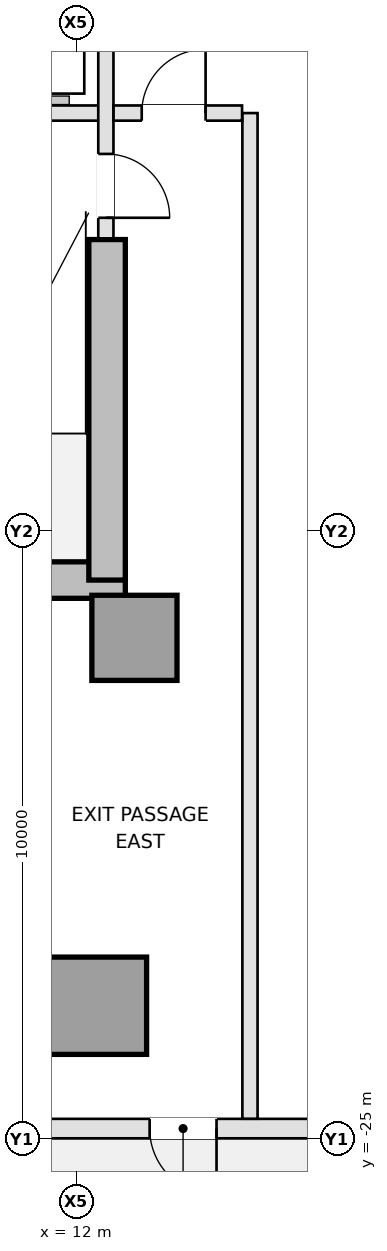
"""IFC4 building model, lengths in metres.
Left out: names, types, materials, properties, quantities, classifications, styles, units other than length and angle.
Written with IfcOpenShell. Run it as: python <this file> out.ifc"""

import sys

from ifc_helpers import new_model, si_unit, direction, frame, frame_2d, origin, origin_2d, place, context, subcontext, project, spatial, rectangle, extrude, element, fill, save


model = new_model("IFC4")
c1 = context("Model", 3, precision=1e-05, world=origin(), true_north=direction((0.0, 1.0)))
c2 = subcontext(c1, "Body", "Model", "MODEL_VIEW")
j1 = project(units=[si_unit("LENGTHUNIT", "METRE"), si_unit("PLANEANGLEUNIT", "RADIAN")], contexts=[c1])
p1 = place(None, origin())
s1 = spatial("IfcSite", under=j1, at=p1, CompositionType="ELEMENT")
p2 = place(p1, origin())
s2 = spatial("IfcBuilding", under=s1, at=p2, CompositionType="ELEMENT")
p3 = place(p2, origin())
s3 = spatial("IfcBuildingStorey", under=s2, at=p3, CompositionType="ELEMENT", Elevation=0.0)
p4 = place(p3, frame((8.6, -15.8, 0.0), z_axis=(0.0, 0.0, 1.0), x_axis=(1.0, 0.0, 0.0)))
e1 = element("IfcWall", 1, at=p4, inside=s3, PredefinedType="SHEAR", context=c2, shape_type="SweptSolid", body=[
    extrude(rectangle(XDim=4.2, YDim=0.6, at=frame_2d((2.1, 0.0))), origin(), (0.0, 0.0, 1.0), 5.0),
])
p5 = place(p3, frame((12.5, -15.8, 0.0), z_axis=(0.0, 0.0, 1.0), x_axis=(0.0, 1.0, 0.0)))
e2 = element("IfcWall", 2, at=p5, inside=s3, PredefinedType="SHEAR", context=c2, shape_type="SweptSolid", body=[
    extrude(rectangle(XDim=5.6, YDim=0.6, at=frame_2d((2.8, 0.0))), origin(), (0.0, 0.0, 1.0), 5.0),
])
p6 = place(p3, frame((12.95, -16.75, 0.0), z_axis=(0.0, 0.0, 1.0), x_axis=(1.0, 0.0, 0.0)))
e3 = element("IfcColumn", 3, at=p6, inside=s3, PredefinedType="COLUMN", context=c2, shape_type="SweptSolid", body=[
    extrude(rectangle(XDim=1.4, YDim=1.4, at=origin_2d()), origin(), (0.0, 0.0, 1.0), 5.0),
])
p7 = place(p3, frame((12.35, -22.8, 0.0), z_axis=(0.0, 0.0, 1.0), x_axis=(1.0, 0.0, 0.0)))
e4 = element("IfcColumn", 4, at=p7, inside=s3, PredefinedType="COLUMN", context=c2, shape_type="SweptSolid", body=[
    extrude(rectangle(XDim=1.6, YDim=1.6, at=origin_2d()), origin(), (0.0, 0.0, 1.0), 5.0),
])
p8 = place(p3, frame((24.6, -24.82, 0.0), z_axis=(0.0, 0.0, 1.0), x_axis=(-1.0, 0.0, 0.0)))
e5 = element("IfcWall", 5, at=p8, inside=s3, PredefinedType="STANDARD", context=c2, shape_type="SweptSolid", body=[
    extrude(rectangle(XDim=13.2, YDim=0.32, at=frame_2d((6.6, 0.0))), origin(), (0.0, 0.0, 1.0), 4.7),
])
p9 = place(p8, frame((10.3, 0.0, 0.0)))
e6 = element("IfcOpeningElement", 6, at=p9, cuts=e5, PredefinedType="OPENING", context=c2, shape_type="SweptSolid", body=[
    extrude(rectangle(XDim=1.1, YDim=2.2, at=frame_2d((0.55, 1.1))), frame((0.0, 0.17, 0.0), z_axis=(0.0, -1.0, 0.0), x_axis=(1.0, 0.0, 0.0)), (0.0, 0.0, 1.0), 0.34),
])
p10 = place(p3, frame((9.16, -8.12, 0.0), z_axis=(0.0, 0.0, 1.0), x_axis=(1.0, 0.0, 0.0)))
e7 = element("IfcWall", 7, at=p10, inside=s3, PredefinedType="PARTITIONING", context=c2, shape_type="SweptSolid", body=[
    extrude(rectangle(XDim=3.22, YDim=0.25, at=frame_2d((1.61, 0.0))), origin(), (0.0, 0.0, 1.0), 4.7),
])
p11 = place(p3, frame((12.48, -5.502, 0.0), z_axis=(0.0, 0.0, 1.0), x_axis=(0.0, -1.0, 0.0)))
e8 = element("IfcWall", 8, at=p11, inside=s3, PredefinedType="PARTITIONING", context=c2, shape_type="SweptSolid", body=[
    extrude(rectangle(XDim=4.678, YDim=0.25, at=frame_2d((2.339, 0.0))), origin(), (0.0, 0.0, 1.0), 4.7),
])
p12 = place(p11, frame((3.29, 0.0, 0.0)))
e9 = element("IfcOpeningElement", 9, at=p12, cuts=e8, PredefinedType="OPENING", context=c2, shape_type="SweptSolid", body=[
    extrude(rectangle(XDim=1.05, YDim=2.15, at=frame_2d((0.525, 1.075))), frame((0.0, 0.135, 0.0), z_axis=(0.0, -1.0, 0.0), x_axis=(1.0, 0.0, 0.0)), (0.0, 0.0, 1.0), 0.27),
])
p13 = place(p3, frame((14.85, -24.658, 0.0), z_axis=(0.0, 0.0, 1.0), x_axis=(0.0, 1.0, 0.0)))
e10 = element("IfcWall", 10, at=p13, inside=s3, PredefinedType="PARTITIONING", context=c2, shape_type="SweptSolid", body=[
    extrude(rectangle(XDim=16.538, YDim=0.25, at=frame_2d((8.269, 0.0))), origin(), (0.0, 0.0, 1.0), 4.7),
])
p14 = place(p3, frame((12.607, -8.12, 0.0), z_axis=(0.0, 0.0, 1.0), x_axis=(1.0, 0.0, 0.0)))
e11 = element("IfcWall", 11, at=p14, inside=s3, PredefinedType="PARTITIONING", context=c2, shape_type="SweptSolid", body=[
    extrude(rectangle(XDim=2.113, YDim=0.25, at=frame_2d((1.057, 0.0))), origin(), (0.0, 0.0, 1.0), 4.7),
])
p15 = place(p14, frame((0.463, 0.0, 0.0)))
e12 = element("IfcOpeningElement", 12, at=p15, cuts=e11, PredefinedType="OPENING", context=c2, shape_type="SweptSolid", body=[
    extrude(rectangle(XDim=1.05, YDim=2.15, at=frame_2d((0.525, 1.075))), frame((0.0, 0.135, 0.0), z_axis=(0.0, -1.0, 0.0), x_axis=(1.0, 0.0, 0.0)), (0.0, 0.0, 1.0), 0.27),
])
p16 = place(p9, origin())
e13 = element("IfcDoor", 13, at=p16, inside=s3, OperationType="SINGLE_SWING_LEFT", PredefinedType="DOOR", context=c2, shape_type="SweptSolid", body=[
    extrude(rectangle(XDim=1.1, YDim=2.2, at=frame_2d((0.55, 1.1))), frame((0.0, 0.025, 0.0), z_axis=(0.0, -1.0, 0.0), x_axis=(1.0, 0.0, 0.0)), (0.0, 0.0, 1.0), 0.05),
])
fill(e6, e13)
p17 = place(p15, origin())
e14 = element("IfcDoor", 14, at=p17, inside=s3, OperationType="SINGLE_SWING_RIGHT", PredefinedType="DOOR", context=c2, shape_type="SweptSolid", body=[
    extrude(rectangle(XDim=1.05, YDim=2.15, at=frame_2d((0.525, 1.075))), frame((0.0, 0.025, 0.0), z_axis=(0.0, -1.0, 0.0), x_axis=(1.0, 0.0, 0.0)), (0.0, 0.0, 1.0), 0.05),
])
fill(e12, e14)
p18 = place(p12, origin())
e15 = element("IfcDoor", 15, at=p18, inside=s3, OperationType="SINGLE_SWING_RIGHT", PredefinedType="DOOR", context=c2, shape_type="SweptSolid", body=[
    extrude(rectangle(XDim=1.05, YDim=2.15, at=frame_2d((0.525, 1.075))), frame((0.0, 0.025, 0.0), z_axis=(0.0, -1.0, 0.0), x_axis=(1.0, 0.0, 0.0)), (0.0, 0.0, 1.0), 0.05),
])
fill(e9, e15)
save(model, sys.argv[1])
